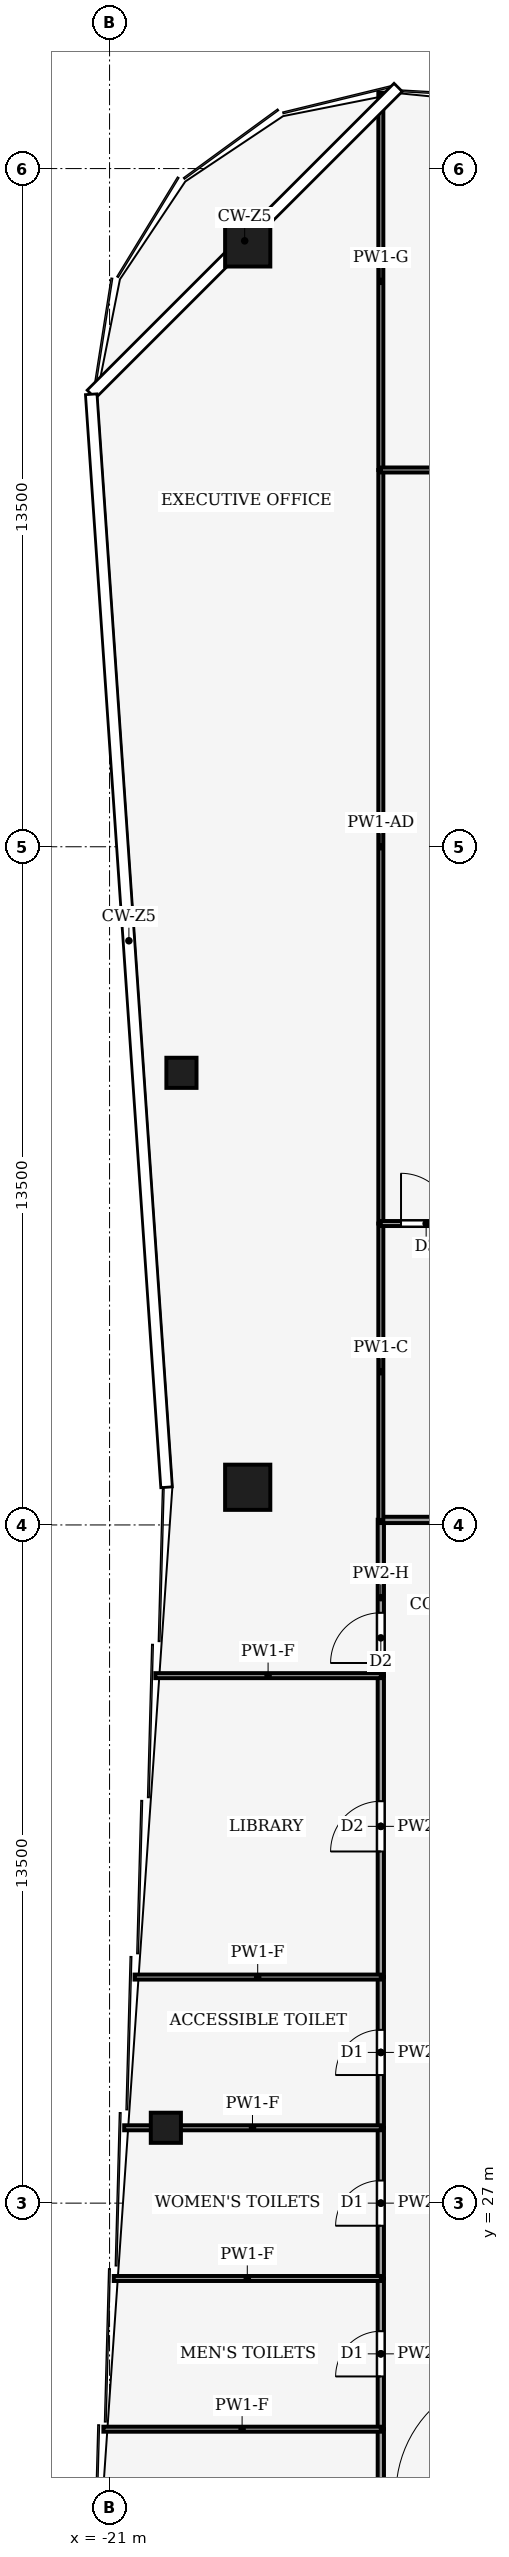
"""IFC4 building model, lengths in metres.
Left out: names, types, materials, properties, quantities, classifications, styles, units other than length and angle.
Written with IfcOpenShell. Run it as: python <this file> out.ifc"""

import sys

from ifc_helpers import new_model, si_unit, direction, frame, frame_2d, origin, origin_2d, place, context, subcontext, project, spatial, rectangle, hollow_rectangle, extrude, element, fill, save


model = new_model("IFC4")
c1 = context("Model", 3, precision=1e-05, world=origin(), true_north=direction((0.0, 1.0)))
c2 = subcontext(c1, "Body", "Model", "MODEL_VIEW")
j1 = project(units=[si_unit("LENGTHUNIT", "METRE"), si_unit("PLANEANGLEUNIT", "RADIAN")], contexts=[c1])
p1 = place(None, origin())
s1 = spatial("IfcSite", under=j1, at=p1, CompositionType="ELEMENT")
p2 = place(p1, origin())
s2 = spatial("IfcBuilding", under=s1, at=p2, CompositionType="ELEMENT")
p3 = place(p2, frame((0.0, 0.0, 322.0)))
s3 = spatial("IfcBuildingStorey", under=s2, at=p3, CompositionType="ELEMENT", Elevation=322.0)
for number, where, z_axis, x_axis in (
    (1, (-18.25, 66.0, 0.0), (0.0, 0.0, 1.0), (1.0, 0.0, 0.0)),
    (2, (-18.25, 41.25, 0.0), (0.0, 0.0, 1.0), (1.0, 0.0, 0.0)),
):
    element("IfcColumn", number, at=place(p3, frame(where, z_axis=z_axis, x_axis=x_axis)), inside=s3, PredefinedType="COLUMN", context=c2, shape_type="SweptSolid", body=[
        extrude(hollow_rectangle(XDim=0.9, YDim=0.9, WallThickness=0.04, at=origin_2d()), origin(), (0.0, 0.0, 1.0), 4.0),
    ])
for number, where, z_axis, x_axis in (
    (3, (-19.879, 28.5, 0.0), (0.0, 0.0, 1.0), (1.0, 0.0, 0.0)),
    (4, (-19.569, 49.5, 0.0), (0.0, 0.0, 1.0), (1.0, 0.0, 0.0)),
):
    element("IfcColumn", number, at=place(p3, frame(where, z_axis=z_axis, x_axis=x_axis)), inside=s3, PredefinedType="COLUMN", context=c2, shape_type="SweptSolid", body=[
        extrude(hollow_rectangle(XDim=0.6, YDim=0.6, WallThickness=0.025, at=origin_2d()), origin(), (0.0, 0.0, 1.0), 4.0),
    ])
p4 = place(p3, frame((-15.6, 13.49, 0.0), z_axis=(0.0, 0.0, 1.0), x_axis=(0.0, 1.0, 0.0)))
e5 = element("IfcWall", 5, at=p4, inside=s3, PredefinedType="PARTITIONING", context=c2, shape_type="SweptSolid", body=[
    extrude(rectangle(XDim=9.01, YDim=0.125, at=frame_2d((4.505, 0.0))), origin(), (0.0, 0.0, 1.0), 2.93),
])
p5 = place(p4, frame((5.271, 0.0, 0.0)))
e6 = element("IfcOpeningElement", 6, at=p5, cuts=e5, PredefinedType="OPENING", context=c2, shape_type="SweptSolid", body=[
    extrude(rectangle(XDim=1.0, YDim=2.1, at=frame_2d((0.5, 1.05))), frame((0.0, 0.073, 0.0), z_axis=(0.0, -1.0, 0.0), x_axis=(1.0, 0.0, 0.0)), (0.0, 0.0, 1.0), 0.145),
])
p6 = place(p3, frame((-15.6, 22.5, 0.0), z_axis=(0.0, 0.0, 1.0), x_axis=(0.0, 1.0, 0.0)))
e7 = element("IfcWall", 7, at=p6, inside=s3, PredefinedType="PARTITIONING", context=c2, shape_type="SweptSolid", body=[
    extrude(rectangle(XDim=3.0, YDim=0.125, at=frame_2d((1.5, 0.0))), origin(), (0.0, 0.0, 1.0), 3.54),
])
p7 = place(p6, frame((1.05, 0.0, 0.0)))
e8 = element("IfcOpeningElement", 8, at=p7, cuts=e7, PredefinedType="OPENING", context=c2, shape_type="SweptSolid", body=[
    extrude(rectangle(XDim=0.9, YDim=2.1, at=frame_2d((0.45, 1.05))), frame((0.0, 0.073, 0.0), z_axis=(0.0, -1.0, 0.0), x_axis=(1.0, 0.0, 0.0)), (0.0, 0.0, 1.0), 0.145),
])
p8 = place(p3, frame((-15.6, 25.5, 0.0), z_axis=(0.0, 0.0, 1.0), x_axis=(0.0, 1.0, 0.0)))
e9 = element("IfcWall", 9, at=p8, inside=s3, PredefinedType="PARTITIONING", context=c2, shape_type="SweptSolid", body=[
    extrude(rectangle(XDim=3.0, YDim=0.125, at=frame_2d((1.5, 0.0))), origin(), (0.0, 0.0, 1.0), 3.87),
])
p9 = place(p8, frame((1.05, 0.0, 0.0)))
e10 = element("IfcOpeningElement", 10, at=p9, cuts=e9, PredefinedType="OPENING", context=c2, shape_type="SweptSolid", body=[
    extrude(rectangle(XDim=0.9, YDim=2.1, at=frame_2d((0.45, 1.05))), frame((0.0, 0.073, 0.0), z_axis=(0.0, -1.0, 0.0), x_axis=(1.0, 0.0, 0.0)), (0.0, 0.0, 1.0), 0.145),
])
p10 = place(p3, frame((-15.6, 28.5, 0.0), z_axis=(0.0, 0.0, 1.0), x_axis=(0.0, 1.0, 0.0)))
e11 = element("IfcWall", 11, at=p10, inside=s3, PredefinedType="PARTITIONING", context=c2, shape_type="SweptSolid", body=[
    extrude(rectangle(XDim=3.0, YDim=0.125, at=frame_2d((1.5, 0.0))), origin(), (0.0, 0.0, 1.0), 3.87),
])
p11 = place(p10, frame((1.05, 0.0, 0.0)))
e12 = element("IfcOpeningElement", 12, at=p11, cuts=e11, PredefinedType="OPENING", context=c2, shape_type="SweptSolid", body=[
    extrude(rectangle(XDim=0.9, YDim=2.1, at=frame_2d((0.45, 1.05))), frame((0.0, 0.073, 0.0), z_axis=(0.0, -1.0, 0.0), x_axis=(1.0, 0.0, 0.0)), (0.0, 0.0, 1.0), 0.145),
])
p12 = place(p3, frame((-15.6, 31.5, 0.0), z_axis=(0.0, 0.0, 1.0), x_axis=(0.0, 1.0, 0.0)))
e13 = element("IfcWall", 13, at=p12, inside=s3, PredefinedType="PARTITIONING", context=c2, shape_type="SweptSolid", body=[
    extrude(rectangle(XDim=6.0, YDim=0.125, at=frame_2d((3.0, 0.0))), origin(), (0.0, 0.0, 1.0), 3.54),
])
p13 = place(p12, frame((2.5, 0.0, 0.0)))
e14 = element("IfcOpeningElement", 14, at=p13, cuts=e13, PredefinedType="OPENING", context=c2, shape_type="SweptSolid", body=[
    extrude(rectangle(XDim=1.0, YDim=2.1, at=frame_2d((0.5, 1.05))), frame((0.0, 0.073, 0.0), z_axis=(0.0, -1.0, 0.0), x_axis=(1.0, 0.0, 0.0)), (0.0, 0.0, 1.0), 0.145),
])
p14 = place(p3, frame((-15.6, 37.5, 0.0), z_axis=(0.0, 0.0, 1.0), x_axis=(0.0, 1.0, 0.0)))
e15 = element("IfcWall", 15, at=p14, inside=s3, PredefinedType="PARTITIONING", context=c2, shape_type="SweptSolid", body=[
    extrude(rectangle(XDim=3.104, YDim=0.125, at=frame_2d((1.552, 0.0))), origin(), (0.0, 0.0, 1.0), 3.14),
])
p15 = place(p14, frame((0.252, 0.0, 0.0)))
e16 = element("IfcOpeningElement", 16, at=p15, cuts=e15, PredefinedType="OPENING", context=c2, shape_type="SweptSolid", body=[
    extrude(rectangle(XDim=1.0, YDim=2.1, at=frame_2d((0.5, 1.05))), frame((0.0, 0.073, 0.0), z_axis=(0.0, -1.0, 0.0), x_axis=(1.0, 0.0, 0.0)), (0.0, 0.0, 1.0), 0.145),
])
p16 = place(p3, frame((-15.6, 40.6, 0.0), z_axis=(0.0, 0.0, 1.0), x_axis=(1.0, 0.0, 0.0)))
e17 = element("IfcWall", 17, at=p16, inside=s3, PredefinedType="PARTITIONING", context=c2, shape_type="SweptSolid", body=[
    extrude(rectangle(XDim=6.6, YDim=0.125, at=frame_2d((3.3, 0.0))), origin(), (0.0, 0.0, 1.0), 3.39),
])
p17 = place(p16, frame((2.8, 0.0, 0.0)))
e18 = element("IfcOpeningElement", 18, at=p17, cuts=e17, PredefinedType="OPENING", context=c2, shape_type="SweptSolid", body=[
    extrude(rectangle(XDim=1.0, YDim=2.1, at=frame_2d((0.5, 1.05))), frame((0.0, 0.073, 0.0), z_axis=(0.0, -1.0, 0.0), x_axis=(1.0, 0.0, 0.0)), (0.0, 0.0, 1.0), 0.145),
])
p18 = place(p3, frame((-15.6, 22.5, 0.0), z_axis=(0.0, 0.0, 1.0), x_axis=(-1.0, 0.0, 0.0)))
e19 = element("IfcWall", 19, at=p18, inside=s3, PredefinedType="PARTITIONING", context=c2, shape_type="SweptSolid", body=[
    extrude(rectangle(XDim=5.523, YDim=0.1, at=frame_2d((2.761, 0.0))), origin(), (0.0, 0.0, 1.0), 3.04),
])
p19 = place(p3, frame((-15.6, 25.5, 0.0), z_axis=(0.0, 0.0, 1.0), x_axis=(-1.0, 0.0, 0.0)))
e20 = element("IfcWall", 20, at=p19, inside=s3, PredefinedType="PARTITIONING", context=c2, shape_type="SweptSolid", body=[
    extrude(rectangle(XDim=5.316, YDim=0.1, at=frame_2d((2.658, 0.0))), origin(), (0.0, 0.0, 1.0), 3.04),
])
p20 = place(p3, frame((-15.6, 28.5, 0.0), z_axis=(0.0, 0.0, 1.0), x_axis=(-1.0, 0.0, 0.0)))
e21 = element("IfcWall", 21, at=p20, inside=s3, PredefinedType="PARTITIONING", context=c2, shape_type="SweptSolid", body=[
    extrude(rectangle(XDim=5.109, YDim=0.1, at=frame_2d((2.555, 0.0))), origin(), (0.0, 0.0, 1.0), 3.04),
])
p21 = place(p3, frame((-15.6, 31.5, 0.0), z_axis=(0.0, 0.0, 1.0), x_axis=(-1.0, 0.0, 0.0)))
e22 = element("IfcWall", 22, at=p21, inside=s3, PredefinedType="PARTITIONING", context=c2, shape_type="SweptSolid", body=[
    extrude(rectangle(XDim=4.902, YDim=0.1, at=frame_2d((2.451, 0.0))), origin(), (0.0, 0.0, 1.0), 3.04),
])
p22 = place(p3, frame((-15.6, 37.5, 0.0), z_axis=(0.0, 0.0, 1.0), x_axis=(-1.0, 0.0, 0.0)))
e23 = element("IfcWall", 23, at=p22, inside=s3, PredefinedType="PARTITIONING", context=c2, shape_type="SweptSolid", body=[
    extrude(rectangle(XDim=4.489, YDim=0.1, at=frame_2d((2.244, 0.0))), origin(), (0.0, 0.0, 1.0), 3.04),
])
p23 = place(p3, frame((-15.6, 40.6, 0.0), z_axis=(0.0, 0.0, 1.0), x_axis=(0.0, 1.0, 0.0)))
e24 = element("IfcWall", 24, at=p23, inside=s3, PredefinedType="PARTITIONING", context=c2, shape_type="SweptSolid", body=[
    extrude(rectangle(XDim=5.9, YDim=0.1, at=frame_2d((2.95, 0.0))), origin(), (0.0, 0.0, 1.0), 3.87),
])
p24 = place(p3, frame((-15.6, 46.5, 0.0), z_axis=(0.0, 0.0, 1.0), x_axis=(0.0, 1.0, 0.0)))
e25 = element("IfcWall", 25, at=p24, inside=s3, PredefinedType="PARTITIONING", context=c2, shape_type="SweptSolid", body=[
    extrude(rectangle(XDim=15.0, YDim=0.1, at=frame_2d((7.5, 0.0))), origin(), (0.0, 0.0, 1.0), 3.35),
])
p25 = place(p3, frame((-15.6, 61.5, 0.0), z_axis=(0.0, 0.0, 1.0), x_axis=(0.0, 1.0, 0.0)))
e26 = element("IfcWall", 26, at=p25, inside=s3, PredefinedType="PARTITIONING", context=c2, shape_type="SweptSolid", body=[
    extrude(rectangle(XDim=7.51, YDim=0.1, at=frame_2d((3.755, 0.0))), origin(), (0.0, 0.0, 1.0), 2.93),
])
p26 = place(p3, frame((-15.6, 46.5, 0.0), z_axis=(0.0, 0.0, 1.0), x_axis=(1.0, 0.0, 0.0)))
e27 = element("IfcWall", 27, at=p26, inside=s3, PredefinedType="PARTITIONING", context=c2, shape_type="SweptSolid", body=[
    extrude(rectangle(XDim=6.604, YDim=0.1, at=frame_2d((3.302, 0.0))), origin(), (0.0, 0.0, 1.0), 3.39),
])
p27 = place(p26, frame((0.402, 0.0, 0.0)))
e28 = element("IfcOpeningElement", 28, at=p27, cuts=e27, PredefinedType="OPENING", context=c2, shape_type="SweptSolid", body=[
    extrude(rectangle(XDim=1.0, YDim=2.1, at=frame_2d((0.5, 1.05))), frame((0.0, 0.06, 0.0), z_axis=(0.0, -1.0, 0.0), x_axis=(1.0, 0.0, 0.0)), (0.0, 0.0, 1.0), 0.12),
])
p28 = place(p3, frame((-15.6, 61.5, 0.0), z_axis=(0.0, 0.0, 1.0), x_axis=(1.0, 0.0, 0.0)))
e29 = element("IfcWall", 29, at=p28, inside=s3, PredefinedType="PARTITIONING", context=c2, shape_type="SweptSolid", body=[
    extrude(rectangle(XDim=9.6, YDim=0.1, at=frame_2d((4.8, 0.0))), origin(), (0.0, 0.0, 1.0), 3.24),
])
p29 = place(p28, frame((4.3, 0.0, 0.0)))
e30 = element("IfcOpeningElement", 30, at=p29, cuts=e29, PredefinedType="OPENING", context=c2, shape_type="SweptSolid", body=[
    extrude(rectangle(XDim=1.0, YDim=2.1, at=frame_2d((0.5, 1.05))), frame((0.0, 0.06, 0.0), z_axis=(0.0, -1.0, 0.0), x_axis=(1.0, 0.0, 0.0)), (0.0, 0.0, 1.0), 0.12),
])
p30 = place(p7, origin())
e31 = element("IfcDoor", 31, at=p30, inside=s3, OperationType="SINGLE_SWING_RIGHT", PredefinedType="DOOR", context=c2, shape_type="SweptSolid", body=[
    extrude(rectangle(XDim=0.9, YDim=2.1, at=frame_2d((0.45, 1.05))), frame((0.0, 0.025, 0.0), z_axis=(0.0, -1.0, 0.0), x_axis=(1.0, 0.0, 0.0)), (0.0, 0.0, 1.0), 0.05),
])
fill(e8, e31)
p31 = place(p9, origin())
e32 = element("IfcDoor", 32, at=p31, inside=s3, OperationType="SINGLE_SWING_LEFT", PredefinedType="DOOR", context=c2, shape_type="SweptSolid", body=[
    extrude(rectangle(XDim=0.9, YDim=2.1, at=frame_2d((0.45, 1.05))), frame((0.0, 0.025, 0.0), z_axis=(0.0, -1.0, 0.0), x_axis=(1.0, 0.0, 0.0)), (0.0, 0.0, 1.0), 0.05),
])
fill(e10, e32)
p32 = place(p11, origin())
e33 = element("IfcDoor", 33, at=p32, inside=s3, OperationType="SINGLE_SWING_RIGHT", PredefinedType="DOOR", context=c2, shape_type="SweptSolid", body=[
    extrude(rectangle(XDim=0.9, YDim=2.1, at=frame_2d((0.45, 1.05))), frame((0.0, 0.025, 0.0), z_axis=(0.0, -1.0, 0.0), x_axis=(1.0, 0.0, 0.0)), (0.0, 0.0, 1.0), 0.05),
])
fill(e12, e33)
p33 = place(p13, origin())
e34 = element("IfcDoor", 34, at=p33, inside=s3, OperationType="SINGLE_SWING_LEFT", PredefinedType="DOOR", context=c2, shape_type="SweptSolid", body=[
    extrude(rectangle(XDim=1.0, YDim=2.1, at=frame_2d((0.5, 1.05))), frame((0.0, 0.025, 0.0), z_axis=(0.0, -1.0, 0.0), x_axis=(1.0, 0.0, 0.0)), (0.0, 0.0, 1.0), 0.05),
])
fill(e14, e34)
p34 = place(p15, origin())
e35 = element("IfcDoor", 35, at=p34, inside=s3, OperationType="SINGLE_SWING_LEFT", PredefinedType="DOOR", context=c2, shape_type="SweptSolid", body=[
    extrude(rectangle(XDim=1.0, YDim=2.1, at=frame_2d((0.5, 1.05))), frame((0.0, 0.025, 0.0), z_axis=(0.0, -1.0, 0.0), x_axis=(1.0, 0.0, 0.0)), (0.0, 0.0, 1.0), 0.05),
])
fill(e16, e35)
p35 = place(p27, origin())
e36 = element("IfcDoor", 36, at=p35, inside=s3, OperationType="SINGLE_SWING_LEFT", PredefinedType="DOOR", context=c2, shape_type="SweptSolid", body=[
    extrude(rectangle(XDim=1.0, YDim=2.1, at=frame_2d((0.5, 1.05))), frame((0.0, 0.025, 0.0), z_axis=(0.0, -1.0, 0.0), x_axis=(1.0, 0.0, 0.0)), (0.0, 0.0, 1.0), 0.05),
])
fill(e28, e36)
save(model, sys.argv[1])
